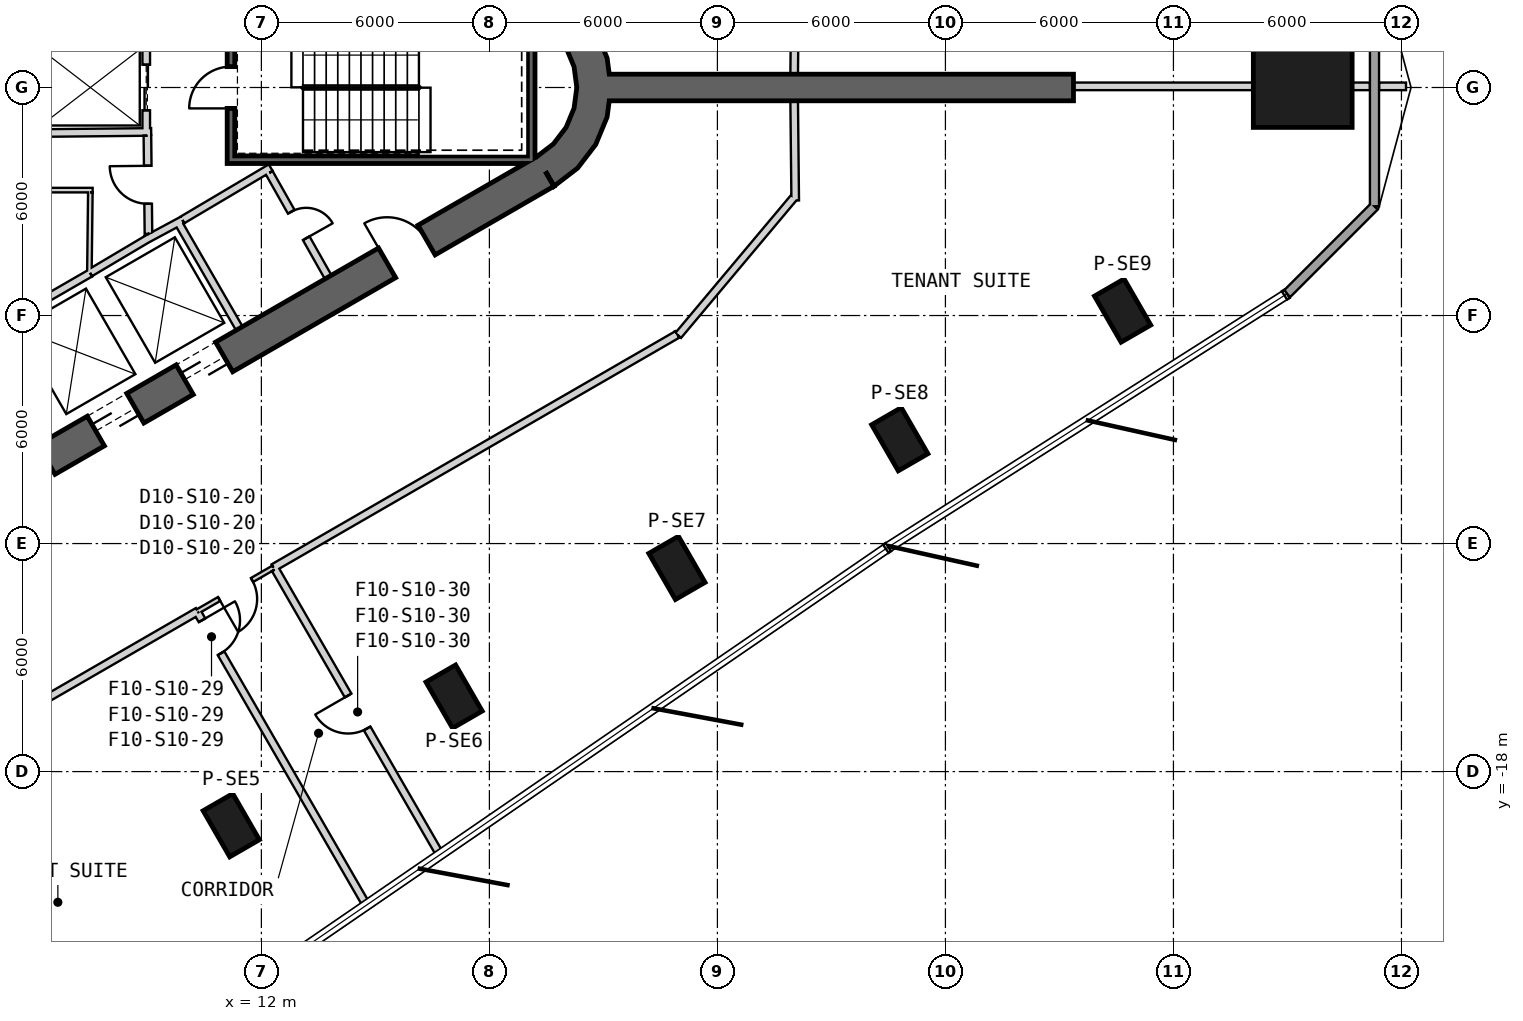
"""IFC4 building model, lengths in metres.
Left out: names, types, materials, properties, quantities, classifications, styles, units other than length and angle.
Written with IfcOpenShell. Run it as: python <this file> out.ifc"""

import sys

from ifc_helpers import new_model, si_unit, direction, frame, frame_2d, origin, origin_2d, place, context, subcontext, project, spatial, polyline, rectangle, outline, extrude, element, fill, save


model = new_model("IFC4")
c1 = context("Model", 3, precision=1e-05, world=origin(), true_north=direction((0.0, 1.0)))
c2 = subcontext(c1, "Body", "Model", "MODEL_VIEW")
j1 = project(units=[si_unit("LENGTHUNIT", "METRE"), si_unit("PLANEANGLEUNIT", "RADIAN")], contexts=[c1])
p1 = place(None, origin())
s1 = spatial("IfcSite", under=j1, at=p1, CompositionType="ELEMENT")
p2 = place(p1, origin())
s2 = spatial("IfcBuilding", under=s1, at=p2, CompositionType="ELEMENT")
p3 = place(p2, frame((0.0, 0.0, 181.2)))
s3 = spatial("IfcBuildingStorey", under=s2, at=p3, CompositionType="ELEMENT", Elevation=181.2)
p4 = place(p3, frame((39.402, 0.0, 0.0), z_axis=(0.0, 0.0, 1.0), x_axis=(1.0, 0.0, 0.0)))
e1 = element("IfcColumn", 1, at=p4, inside=s3, PredefinedType="COLUMN", context=c2, shape_type="SweptSolid", body=[
    extrude(rectangle(XDim=2.6, YDim=2.1, at=origin_2d()), origin(), (0.0, 0.0, 1.0), 4.0),
])
for number, where, z_axis, x_axis in (
    (2, (11.207, -19.412, 0.0), (0.0, 0.0, 1.0), (0.5, -0.866, 0.0)),
    (3, (17.071, -16.026, 0.0), (0.0, 0.0, 1.0), (0.5, -0.866, 0.0)),
    (4, (22.935, -12.641, 0.0), (0.0, 0.0, 1.0), (0.5, -0.866, 0.0)),
    (5, (28.799, -9.255, 0.0), (0.0, 0.0, 1.0), (0.5, -0.866, 0.0)),
    (6, (34.663, -5.87, 0.0), (0.0, 0.0, 1.0), (0.5, -0.866, 0.0)),
):
    element("IfcColumn", number, at=place(p3, frame(where, z_axis=z_axis, x_axis=x_axis)), inside=s3, PredefinedType="COLUMN", context=c2, shape_type="SweptSolid", body=[
        extrude(rectangle(XDim=1.4, YDim=0.9, at=origin_2d()), origin(), (0.0, 0.0, 1.0), 4.0),
    ])
p5 = place(p3, frame((-7.825, -17.97, 0.0), z_axis=(0.0, 0.0, 1.0), x_axis=(0.866028369851, 0.499994862586, 0.0)))
e7 = element("IfcWall", 7, at=p5, inside=s3, PredefinedType="SHEAR", context=c2, shape_type="SweptSolid", body=[
    extrude(rectangle(XDim=31.523, YDim=0.9, at=frame_2d((15.762, 0.0))), origin(), (0.0, 0.0, 1.0), 4.0),
])
p6 = place(p5, frame((7.062, 0.0, 0.0)))
e8 = element("IfcOpeningElement", 8, at=p6, cuts=e7, PredefinedType="OPENING", context=c2, shape_type="SweptSolid", body=[
    extrude(rectangle(XDim=1.2, YDim=2.4, at=frame_2d((0.6, 1.2))), frame((0.0, 0.46, 0.0), z_axis=(0.0, -1.0, 0.0), x_axis=(1.0, 0.0, 0.0)), (0.0, 0.0, 1.0), 0.92),
])
p7 = place(p5, frame((9.762, 0.0, 0.0)))
e9 = element("IfcOpeningElement", 9, at=p7, cuts=e7, PredefinedType="OPENING", context=c2, shape_type="SweptSolid", body=[
    extrude(rectangle(XDim=1.2, YDim=2.4, at=frame_2d((0.6, 1.2))), frame((0.0, 0.46, 0.0), z_axis=(0.0, -1.0, 0.0), x_axis=(1.0, 0.0, 0.0)), (0.0, 0.0, 1.0), 0.92),
])
p8 = place(p5, frame((12.462, 0.0, 0.0)))
e10 = element("IfcOpeningElement", 10, at=p8, cuts=e7, PredefinedType="OPENING", context=c2, shape_type="SweptSolid", body=[
    extrude(rectangle(XDim=1.2, YDim=2.4, at=frame_2d((0.6, 1.2))), frame((0.0, 0.46, 0.0), z_axis=(0.0, -1.0, 0.0), x_axis=(1.0, 0.0, 0.0)), (0.0, 0.0, 1.0), 0.92),
])
p9 = place(p5, frame((15.162, 0.0, 0.0)))
e11 = element("IfcOpeningElement", 11, at=p9, cuts=e7, PredefinedType="OPENING", context=c2, shape_type="SweptSolid", body=[
    extrude(rectangle(XDim=1.2, YDim=2.4, at=frame_2d((0.6, 1.2))), frame((0.0, 0.46, 0.0), z_axis=(0.0, -1.0, 0.0), x_axis=(1.0, 0.0, 0.0)), (0.0, 0.0, 1.0), 0.92),
])
p10 = place(p5, frame((17.862, 0.0, 0.0)))
e12 = element("IfcOpeningElement", 12, at=p10, cuts=e7, PredefinedType="OPENING", context=c2, shape_type="SweptSolid", body=[
    extrude(rectangle(XDim=1.2, YDim=2.4, at=frame_2d((0.6, 1.2))), frame((0.0, 0.46, 0.0), z_axis=(0.0, -1.0, 0.0), x_axis=(1.0, 0.0, 0.0)), (0.0, 0.0, 1.0), 0.92),
])
p11 = place(p5, frame((20.562, 0.0, 0.0)))
e13 = element("IfcOpeningElement", 13, at=p11, cuts=e7, PredefinedType="OPENING", context=c2, shape_type="SweptSolid", body=[
    extrude(rectangle(XDim=1.2, YDim=2.4, at=frame_2d((0.6, 1.2))), frame((0.0, 0.46, 0.0), z_axis=(0.0, -1.0, 0.0), x_axis=(1.0, 0.0, 0.0)), (0.0, 0.0, 1.0), 0.92),
])
p12 = place(p5, frame((26.712, 0.0, 0.0)))
e14 = element("IfcOpeningElement", 14, at=p12, cuts=e7, PredefinedType="OPENING", context=c2, shape_type="SweptSolid", body=[
    extrude(rectangle(XDim=1.2, YDim=2.4, at=frame_2d((0.6, 1.2))), frame((0.0, 0.46, 0.0), z_axis=(0.0, -1.0, 0.0), x_axis=(1.0, 0.0, 0.0)), (0.0, 0.0, 1.0), 0.92),
])
p13 = place(p5, frame((3.612, 0.0, 0.0)))
e15 = element("IfcOpeningElement", 15, at=p13, cuts=e7, PredefinedType="OPENING", context=c2, shape_type="SweptSolid", body=[
    extrude(rectangle(XDim=1.2, YDim=2.4, at=frame_2d((0.6, 1.2))), frame((0.0, 0.46, 0.0), z_axis=(0.0, -1.0, 0.0), x_axis=(1.0, 0.0, 0.0)), (0.0, 0.0, 1.0), 0.92),
])
p14 = place(p3, origin())
e16 = element("IfcWall", 16, at=p14, inside=s3, PredefinedType="SHEAR", context=c2, shape_type="SweptSolid", body=[
    extrude(outline(polyline([(19.7, -2.598), (20.321, -2.121), (20.798, -1.5), (21.098, -0.777), (21.2, 0.0), (21.098, 0.777), (20.798, 1.5), (20.321, 2.121), (19.7, 2.598), (19.25, 1.819), (19.685, 1.485), (20.019, 1.05), (20.229, 0.543), (20.3, 0.0), (20.229, -0.543), (20.019, -1.05), (19.685, -1.485), (19.25, -1.819), (19.7, -2.598)])), origin(), (0.0, 0.0, 1.0), 4.0),
])
p15 = place(p3, frame((21.15, 0.0, 0.0), z_axis=(0.0, 0.0, 1.0), x_axis=(1.0, 0.0, 0.0)))
e17 = element("IfcWall", 17, at=p15, inside=s3, PredefinedType="SHEAR", context=c2, shape_type="SweptSolid", body=[
    extrude(rectangle(XDim=12.22, YDim=0.7, at=frame_2d((6.11, 0.0))), origin(), (0.0, 0.0, 1.0), 4.0),
])
p16 = place(p3, frame((38.988, -5.428, 0.0), z_axis=(0.0, 0.0, 1.0), x_axis=(0.707144274587, 0.707069285798, 0.0)))
e18 = element("IfcWall", 18, at=p16, inside=s3, PredefinedType="SOLIDWALL", context=c2, shape_type="SweptSolid", body=[
    extrude(rectangle(XDim=3.256, YDim=0.24, at=frame_2d((1.628, 0.0))), origin(), (0.0, 0.0, 1.0), 3.7),
])
p17 = place(p3, frame((41.291, -3.126, 0.0), z_axis=(0.0, 0.0, 1.0), x_axis=(0.0, 1.0, 0.0)))
e19 = element("IfcWall", 19, at=p17, inside=s3, PredefinedType="SOLIDWALL", context=c2, shape_type="SweptSolid", body=[
    extrude(rectangle(XDim=6.253, YDim=0.24, at=frame_2d((3.126, 0.0))), origin(), (0.0, 0.0, 1.0), 3.7),
])
p18 = place(p3, frame((0.483, -8.936, 0.0), z_axis=(0.0, 0.0, 1.0), x_axis=(0.866030989016, 0.499990325971, 0.0)))
e20 = element("IfcWall", 20, at=p18, inside=s3, PredefinedType="PLUMBINGWALL", context=c2, shape_type="SweptSolid", body=[
    extrude(rectangle(XDim=8.1, YDim=0.2, at=frame_2d((4.05, 0.0))), origin(), (0.0, 0.0, 1.0), 3.7),
])
p19 = place(p3, frame((9.795, -3.525, 0.0), z_axis=(0.0, 0.0, 1.0), x_axis=(0.499984717929, -0.866034226713, 0.0)))
e21 = element("IfcWall", 21, at=p19, inside=s3, PredefinedType="PLUMBINGWALL", context=c2, shape_type="SweptSolid", body=[
    extrude(rectangle(XDim=3.25, YDim=0.2, at=frame_2d((1.625, 0.0))), origin(), (0.0, 0.0, 1.0), 3.7),
])
p20 = place(p3, frame((8.974, -3.999, 0.0), z_axis=(0.0, 0.0, 1.0), x_axis=(0.880907015104, 0.473289373154, 0.0)))
e22 = element("IfcWall", 22, at=p20, inside=s3, PredefinedType="PLUMBINGWALL", context=c2, shape_type="SweptSolid", body=[
    extrude(rectangle(XDim=1.078, YDim=0.2, at=frame_2d((0.539, 0.0))), origin(), (0.0, 0.0, 1.0), 3.7),
])
p21 = place(p3, frame((7.493, -4.878, 0.0), z_axis=(0.0, 0.0, 1.0), x_axis=(0.859981807212, 0.510324691999, 0.0)))
e23 = element("IfcWall", 23, at=p21, inside=s3, PredefinedType="PLUMBINGWALL", context=c2, shape_type="SweptSolid", body=[
    extrude(rectangle(XDim=1.845, YDim=0.2, at=frame_2d((0.922, 0.0))), origin(), (0.0, 0.0, 1.0), 3.7),
])
p22 = place(p3, frame((19.1, -2.0, -0.3), z_axis=(0.0, 0.0, 1.0), x_axis=(0.0, 1.0, 0.0)))
e24 = element("IfcWall", 24, at=p22, inside=s3, PredefinedType="SHEAR", context=c2, shape_type="SweptSolid", body=[
    extrude(rectangle(XDim=3.8, YDim=0.2, at=frame_2d((1.9, 0.0))), origin(), (0.0, 0.0, 1.0), 4.0),
])
p23 = place(p3, frame((11.1, -1.9, -0.3), z_axis=(0.0, 0.0, 1.0), x_axis=(1.0, 0.0, 0.0)))
e25 = element("IfcWall", 25, at=p23, inside=s3, PredefinedType="SHEAR", context=c2, shape_type="SweptSolid", body=[
    extrude(rectangle(XDim=7.9, YDim=0.2, at=frame_2d((3.95, 0.0))), origin(), (0.0, 0.0, 1.0), 4.0),
])
p24 = place(p3, frame((11.2, -1.8, -0.3), z_axis=(0.0, 0.0, 1.0), x_axis=(0.0, 1.0, 0.0)))
e26 = element("IfcWall", 26, at=p24, inside=s3, PredefinedType="SHEAR", context=c2, shape_type="SweptSolid", body=[
    extrude(rectangle(XDim=3.6, YDim=0.2, at=frame_2d((1.8, 0.0))), origin(), (0.0, 0.0, 1.0), 4.0),
])
p25 = place(p24, frame((1.25, 0.0, 0.3)))
e27 = element("IfcOpeningElement", 27, at=p25, cuts=e26, PredefinedType="OPENING", context=c2, shape_type="SweptSolid", body=[
    extrude(rectangle(XDim=1.1, YDim=2.1, at=frame_2d((0.55, 1.05))), frame((0.0, 0.11, 0.0), z_axis=(0.0, -1.0, 0.0), x_axis=(1.0, 0.0, 0.0)), (0.0, 0.0, 1.0), 0.22),
])
p26 = place(p3, frame((8.97, 1.2, 0.0), z_axis=(0.0, 0.0, 1.0), x_axis=(0.0, -1.0, 0.0)))
e28 = element("IfcWall", 28, at=p26, inside=s3, PredefinedType="PLUMBINGWALL", context=c2, shape_type="SweptSolid", body=[
    extrude(rectangle(XDim=2.4, YDim=0.2, at=frame_2d((1.2, 0.0))), origin(), (0.0, 0.0, 1.0), 3.7),
])
p27 = place(p26, frame((0.6, 0.0, 0.0)))
e29 = element("IfcOpeningElement", 29, at=p27, cuts=e28, PredefinedType="OPENING", context=c2, shape_type="SweptSolid", body=[
    extrude(rectangle(XDim=1.2, YDim=2.4, at=frame_2d((0.6, 1.2))), frame((0.0, 0.11, 0.0), z_axis=(0.0, -1.0, 0.0), x_axis=(1.0, 0.0, 0.0)), (0.0, 0.0, 1.0), 0.22),
])
p28 = place(p3, frame((5.9, -1.201, 0.0), z_axis=(0.0, 0.0, 1.0), x_axis=(0.999950064753, 0.009993397809, 0.0)))
e30 = element("IfcWall", 30, at=p28, inside=s3, PredefinedType="PLUMBINGWALL", context=c2, shape_type="SweptSolid", body=[
    extrude(rectangle(XDim=3.2, YDim=0.2, at=frame_2d((1.6, 0.0))), origin(), (0.0, 0.0, 1.0), 3.7),
])
p29 = place(p3, frame((12.245, -2.109, 0.0), z_axis=(0.0, 0.0, 1.0), x_axis=(-0.860414880418, -0.509594185166, 0.0)))
e31 = element("IfcWall", 31, at=p29, inside=s3, PredefinedType="PARTITIONING", context=c2, shape_type="SweptSolid", body=[
    extrude(rectangle(XDim=2.7, YDim=0.2, at=frame_2d((1.35, 0.0))), origin(), (0.0, 0.0, 1.0), 3.7),
])
p30 = place(p3, frame((13.758, -4.99, 0.0), z_axis=(0.0, 0.0, 1.0), x_axis=(-0.491993409184, 0.87059892334, 0.0)))
e32 = element("IfcWall", 32, at=p30, inside=s3, PredefinedType="PARTITIONING", context=c2, shape_type="SweptSolid", body=[
    extrude(rectangle(XDim=3.15, YDim=0.2, at=frame_2d((1.575, 0.0))), origin(), (0.0, 0.0, 1.0), 3.7),
])
p31 = place(p30, frame((1.175, 0.0, 0.0)))
e33 = element("IfcOpeningElement", 33, at=p31, cuts=e32, PredefinedType="OPENING", context=c2, shape_type="SweptSolid", body=[
    extrude(rectangle(XDim=0.8, YDim=2.1, at=frame_2d((0.4, 1.05))), frame((0.0, 0.11, 0.0), z_axis=(0.0, -1.0, 0.0), x_axis=(1.0, 0.0, 0.0)), (0.0, 0.0, 1.0), 0.22),
])
p32 = place(p3, frame((9.029, -3.851, 0.0), z_axis=(0.0, 0.0, 1.0), x_axis=(-0.010783593937, 0.99994185536, 0.0)))
e34 = element("IfcWall", 34, at=p32, inside=s3, PredefinedType="PARTITIONING", context=c2, shape_type="SweptSolid", body=[
    extrude(rectangle(XDim=2.581, YDim=0.2, at=frame_2d((1.291, 0.0))), origin(), (0.0, 0.0, 1.0), 3.7),
])
p33 = place(p32, frame((0.791, 0.0, 0.0)))
e35 = element("IfcOpeningElement", 35, at=p33, cuts=e34, PredefinedType="OPENING", context=c2, shape_type="SweptSolid", body=[
    extrude(rectangle(XDim=1.0, YDim=2.1, at=frame_2d((0.5, 1.05))), frame((0.0, 0.11, 0.0), z_axis=(0.0, -1.0, 0.0), x_axis=(1.0, 0.0, 0.0)), (0.0, 0.0, 1.0), 0.22),
])
p34 = place(p3, frame((7.56, -2.7, 0.0), z_axis=(0.0, 0.0, 1.0), x_axis=(-1.0, 0.0, 0.0)))
e36 = element("IfcWall", 36, at=p34, inside=s3, PredefinedType="PARTITIONING", context=c2, shape_type="SweptSolid", body=[
    extrude(rectangle(XDim=3.0, YDim=0.12, at=frame_2d((1.5, 0.0))), origin(), (0.0, 0.0, 1.0), 3.7),
])
p35 = place(p3, frame((7.475, -4.865, 0.0), z_axis=(0.0, 0.0, 1.0), x_axis=(0.011716133148, 0.999931363757, 0.0)))
e37 = element("IfcWall", 37, at=p35, inside=s3, PredefinedType="PARTITIONING", context=c2, shape_type="SweptSolid", body=[
    extrude(rectangle(XDim=2.105, YDim=0.12, at=frame_2d((1.052, 0.0))), origin(), (0.0, 0.0, 1.0), 3.7),
])
p36 = place(p3, frame((26.02, 0.35, 0.0), z_axis=(0.0, 0.0, 1.0), x_axis=(0.010532007244, 0.999944536874, 0.0)))
e38 = element("IfcWall", 38, at=p36, inside=s3, PredefinedType="PARTITIONING", context=c2, shape_type="SweptSolid", body=[
    extrude(rectangle(XDim=2.457, YDim=0.2, at=frame_2d((1.229, 0.0))), origin(), (0.0, 0.0, 1.0), 3.7),
])
p37 = place(p3, frame((12.317, -12.634, 0.0), z_axis=(0.0, 0.0, 1.0), x_axis=(-0.86602648383, -0.499998129301, 0.0)))
e39 = element("IfcWall", 39, at=p37, inside=s3, PredefinedType="PARTITIONING", context=c2, shape_type="SweptSolid", body=[
    extrude(rectangle(XDim=2.3, YDim=0.12, at=frame_2d((1.15, 0.0))), origin(), (0.0, 0.0, 1.0), 3.7),
])
p38 = place(p37, frame((0.65, 0.0, 0.0)))
e40 = element("IfcOpeningElement", 40, at=p38, cuts=e39, PredefinedType="OPENING", context=c2, shape_type="SweptSolid", body=[
    extrude(rectangle(XDim=1.0, YDim=2.1, at=frame_2d((0.5, 1.05))), frame((0.0, 0.07, 0.0), z_axis=(0.0, -1.0, 0.0), x_axis=(1.0, 0.0, 0.0)), (0.0, 0.0, 1.0), 0.14),
])
p39 = place(p3, frame((-0.223, -19.874, 0.0), z_axis=(0.0, 0.0, 1.0), x_axis=(0.866025366729, 0.500000064182, 0.0)))
e41 = element("IfcWall", 41, at=p39, inside=s3, PredefinedType="PARTITIONING", context=c2, shape_type="SweptSolid", body=[
    extrude(rectangle(XDim=12.18, YDim=0.2, at=frame_2d((6.09, 0.0))), origin(), (0.0, 0.0, 1.0), 2.98),
])
p40 = place(p3, frame((12.317, -12.634, 0.0), z_axis=(0.0, 0.0, 1.0), x_axis=(0.866028561818, 0.499994530085, 0.0)))
e42 = element("IfcWall", 42, at=p40, inside=s3, PredefinedType="PARTITIONING", context=c2, shape_type="SweptSolid", body=[
    extrude(rectangle(XDim=12.273, YDim=0.2, at=frame_2d((6.136, 0.0))), origin(), (0.0, 0.0, 1.0), 2.88),
])
p41 = place(p3, frame((26.047, -2.972, 0.0), z_axis=(0.0, 0.0, 1.0), x_axis=(-0.010519853563, 0.99994466481, 0.0)))
e43 = element("IfcWall", 43, at=p41, inside=s3, PredefinedType="PARTITIONING", context=c2, shape_type="SweptSolid", body=[
    extrude(rectangle(XDim=2.623, YDim=0.2, at=frame_2d((1.311, 0.0))), origin(), (0.0, 0.0, 1.0), 3.7),
])
p42 = place(p3, frame((22.968, -6.524, 0.0), z_axis=(0.0, 0.0, 1.0), x_axis=(0.642764400317, 0.766063917493, 0.0)))
e44 = element("IfcWall", 44, at=p42, inside=s3, PredefinedType="PARTITIONING", context=c2, shape_type="SweptSolid", body=[
    extrude(rectangle(XDim=4.74, YDim=0.2, at=frame_2d((2.37, 0.0))), origin(), (0.0, 0.0, 1.0), 2.78),
])
p43 = place(p3, frame((33.37, 0.03, 0.0), z_axis=(0.0, 0.0, 1.0), x_axis=(1.0, 0.0, 0.0)))
e45 = element("IfcWall", 45, at=p43, inside=s3, PredefinedType="PARTITIONING", context=c2, shape_type="SweptSolid", body=[
    extrude(rectangle(XDim=4.733, YDim=0.2, at=frame_2d((2.366, 0.0))), origin(), (0.0, 0.0, 1.0), 3.27),
])
p44 = place(p3, frame((40.702, 0.03, 0.0), z_axis=(0.0, 0.0, 1.0), x_axis=(1.0, 0.0, 0.0)))
e46 = element("IfcWall", 46, at=p44, inside=s3, PredefinedType="PARTITIONING", context=c2, shape_type="SweptSolid", body=[
    extrude(rectangle(XDim=0.468, YDim=0.2, at=frame_2d((0.234, 0.0))), origin(), (0.0, 0.0, 1.0), 3.7),
])
p45 = place(p3, frame((41.41, 0.03, 0.0), z_axis=(0.0, 0.0, 1.0), x_axis=(1.0, 0.0, 0.0)))
e47 = element("IfcWall", 47, at=p45, inside=s3, PredefinedType="PARTITIONING", context=c2, shape_type="SweptSolid", body=[
    extrude(rectangle(XDim=0.71, YDim=0.2, at=frame_2d((0.355, 0.0))), origin(), (0.0, 0.0, 1.0), 3.7),
])
p46 = place(p3, frame((10.338, -13.846, 0.0), z_axis=(0.0, 0.0, 1.0), x_axis=(0.499984974409, -0.86603407864, 0.0)))
e48 = element("IfcWall", 48, at=p46, inside=s3, PredefinedType="PARTITIONING", context=c2, shape_type="SweptSolid", body=[
    extrude(rectangle(XDim=8.855, YDim=0.2, at=frame_2d((4.428, 0.0))), origin(), (0.0, 0.0, 1.0), 3.7),
])
p47 = place(p46, frame((0.2, 0.0, 0.0)))
e49 = element("IfcOpeningElement", 49, at=p47, cuts=e48, PredefinedType="OPENING", context=c2, shape_type="SweptSolid", body=[
    extrude(rectangle(XDim=1.0, YDim=2.1, at=frame_2d((0.5, 1.05))), frame((0.0, 0.11, 0.0), z_axis=(0.0, -1.0, 0.0), x_axis=(1.0, 0.0, 0.0)), (0.0, 0.0, 1.0), 0.22),
])
p48 = place(p3, frame((16.701, -20.187, 0.0), z_axis=(0.0, 0.0, 1.0), x_axis=(-0.500008367389, 0.866020572816, 0.0)))
e50 = element("IfcWall", 50, at=p48, inside=s3, PredefinedType="PARTITIONING", context=c2, shape_type="SweptSolid", body=[
    extrude(rectangle(XDim=8.673, YDim=0.2, at=frame_2d((4.336, 0.0))), origin(), (0.0, 0.0, 1.0), 3.7),
])
p49 = place(p48, frame((3.836, 0.0, 0.0)))
e51 = element("IfcOpeningElement", 51, at=p49, cuts=e50, PredefinedType="OPENING", context=c2, shape_type="SweptSolid", body=[
    extrude(rectangle(XDim=1.0, YDim=2.1, at=frame_2d((0.5, 1.05))), frame((0.0, 0.11, 0.0), z_axis=(0.0, -1.0, 0.0), x_axis=(1.0, 0.0, 0.0)), (0.0, 0.0, 1.0), 0.22),
])
p50 = place(p25, origin())
e52 = element("IfcDoor", 52, at=p50, inside=s3, OperationType="SINGLE_SWING_RIGHT", PredefinedType="USERDEFINED", context=c2, shape_type="SweptSolid", body=[
    extrude(rectangle(XDim=1.1, YDim=2.1, at=frame_2d((0.55, 1.05))), frame((0.0, 0.025, 0.0), z_axis=(0.0, -1.0, 0.0), x_axis=(1.0, 0.0, 0.0)), (0.0, 0.0, 1.0), 0.05),
])
fill(e27, e52)
p51 = place(p33, origin())
e53 = element("IfcDoor", 53, at=p51, inside=s3, OperationType="SINGLE_SWING_RIGHT", PredefinedType="USERDEFINED", context=c2, shape_type="SweptSolid", body=[
    extrude(rectangle(XDim=1.0, YDim=2.1, at=frame_2d((0.5, 1.05))), frame((0.0, 0.025, 0.0), z_axis=(0.0, -1.0, 0.0), x_axis=(1.0, 0.0, 0.0)), (0.0, 0.0, 1.0), 0.05),
])
fill(e35, e53)
p52 = place(p27, origin())
e54 = element("IfcDoor", 54, at=p52, inside=s3, OperationType="SLIDING_TO_LEFT", PredefinedType="USERDEFINED", context=c2, shape_type="SweptSolid", body=[
    extrude(rectangle(XDim=1.2, YDim=2.4, at=frame_2d((0.6, 1.2))), frame((0.0, 0.025, 0.0), z_axis=(0.0, -1.0, 0.0), x_axis=(1.0, 0.0, 0.0)), (0.0, 0.0, 1.0), 0.05),
])
fill(e29, e54)
p53 = place(p31, origin())
e55 = element("IfcDoor", 55, at=p53, inside=s3, OperationType="SINGLE_SWING_RIGHT", PredefinedType="USERDEFINED", context=c2, shape_type="SweptSolid", body=[
    extrude(rectangle(XDim=0.8, YDim=2.1, at=frame_2d((0.4, 1.05))), frame((0.0, 0.025, 0.0), z_axis=(0.0, -1.0, 0.0), x_axis=(1.0, 0.0, 0.0)), (0.0, 0.0, 1.0), 0.05),
])
fill(e33, e55)
p54 = place(p38, origin())
e56 = element("IfcDoor", 56, at=p54, inside=s3, OperationType="SINGLE_SWING_RIGHT", PredefinedType="NOTDEFINED", context=c2, shape_type="SweptSolid", body=[
    extrude(rectangle(XDim=1.0, YDim=2.1, at=frame_2d((0.5, 1.05))), frame((0.0, 0.025, 0.0), z_axis=(0.0, -1.0, 0.0), x_axis=(1.0, 0.0, 0.0)), (0.0, 0.0, 1.0), 0.05),
])
fill(e40, e56)
p55 = place(p47, origin())
e57 = element("IfcDoor", 57, at=p55, inside=s3, OperationType="SINGLE_SWING_LEFT", PredefinedType="USERDEFINED", context=c2, shape_type="SweptSolid", body=[
    extrude(rectangle(XDim=1.0, YDim=2.1, at=frame_2d((0.5, 1.05))), frame((0.0, 0.025, 0.0), z_axis=(0.0, -1.0, 0.0), x_axis=(1.0, 0.0, 0.0)), (0.0, 0.0, 1.0), 0.05),
])
fill(e49, e57)
p56 = place(p49, origin())
e58 = element("IfcDoor", 58, at=p56, inside=s3, OperationType="SINGLE_SWING_LEFT", PredefinedType="USERDEFINED", context=c2, shape_type="SweptSolid", body=[
    extrude(rectangle(XDim=1.0, YDim=2.1, at=frame_2d((0.5, 1.05))), frame((0.0, 0.025, 0.0), z_axis=(0.0, -1.0, 0.0), x_axis=(1.0, 0.0, 0.0)), (0.0, 0.0, 1.0), 0.05),
])
fill(e51, e58)
p57 = place(p10, origin())
e59 = element("IfcDoor", 59, at=p57, inside=s3, OperationType="SLIDING_TO_LEFT", PredefinedType="USERDEFINED", context=c2, shape_type="SweptSolid", body=[
    extrude(rectangle(XDim=1.2, YDim=2.4, at=frame_2d((0.6, 1.2))), frame((0.0, 0.025, 0.0), z_axis=(0.0, -1.0, 0.0), x_axis=(1.0, 0.0, 0.0)), (0.0, 0.0, 1.0), 0.05),
])
fill(e12, e59)
p58 = place(p11, origin())
e60 = element("IfcDoor", 60, at=p58, inside=s3, OperationType="SLIDING_TO_LEFT", PredefinedType="USERDEFINED", context=c2, shape_type="SweptSolid", body=[
    extrude(rectangle(XDim=1.2, YDim=2.4, at=frame_2d((0.6, 1.2))), frame((0.0, 0.025, 0.0), z_axis=(0.0, -1.0, 0.0), x_axis=(1.0, 0.0, 0.0)), (0.0, 0.0, 1.0), 0.05),
])
fill(e13, e60)
p59 = place(p12, origin())
e61 = element("IfcDoor", 61, at=p59, inside=s3, OperationType="SINGLE_SWING_RIGHT", PredefinedType="USERDEFINED", context=c2, shape_type="SweptSolid", body=[
    extrude(rectangle(XDim=1.2, YDim=2.4, at=frame_2d((0.6, 1.2))), frame((0.0, 0.025, 0.0), z_axis=(0.0, -1.0, 0.0), x_axis=(1.0, 0.0, 0.0)), (0.0, 0.0, 1.0), 0.05),
])
fill(e14, e61)
save(model, sys.argv[1])
